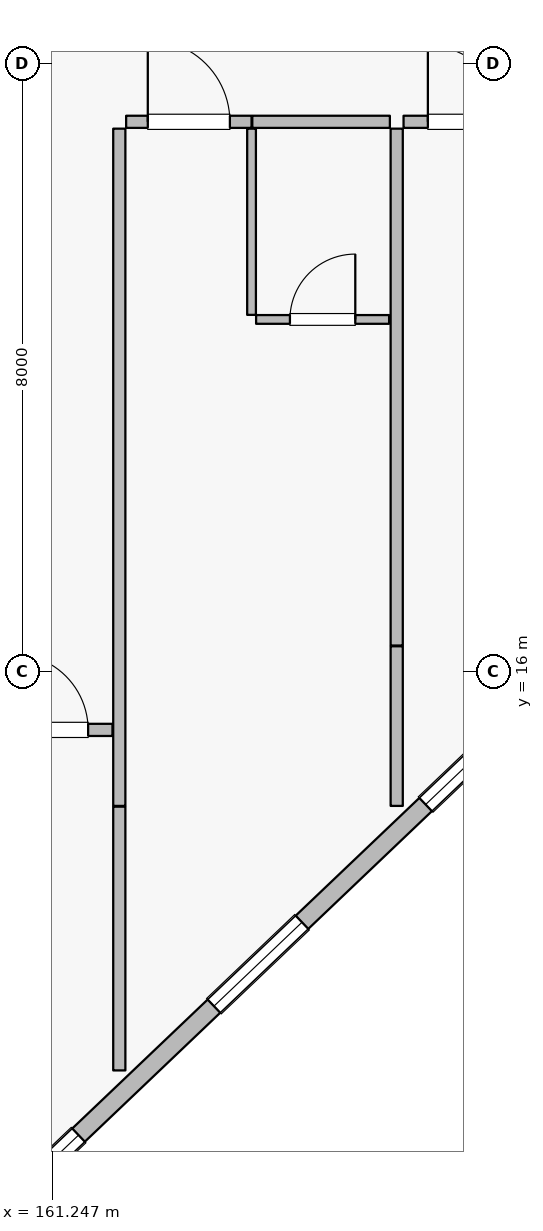
"""IFC4 building model, lengths in metres.
Left out: names, types, materials, properties, quantities, classifications, styles, units other than length and angle.
Written with IfcOpenShell. Run it as: python <this file> out.ifc"""

import sys

from ifc_helpers import new_model, si_unit, direction, frame, frame_2d, origin, place, context, subcontext, project, spatial, rectangle, extrude, element, fill, save


model = new_model("IFC4")
c1 = context("Model", 3, precision=1e-05, world=origin(), true_north=direction((0.0, 1.0)))
c2 = subcontext(c1, "Body", "Model", "MODEL_VIEW")
j1 = project(units=[si_unit("LENGTHUNIT", "METRE"), si_unit("PLANEANGLEUNIT", "RADIAN")], contexts=[c1])
p1 = place(None, origin())
s1 = spatial("IfcSite", under=j1, at=p1, CompositionType="ELEMENT")
p2 = place(p1, origin())
s2 = spatial("IfcBuilding", under=s1, at=p2, CompositionType="ELEMENT")
p3 = place(p2, frame((0.0, 0.0, 11.4)))
s3 = spatial("IfcBuildingStorey", under=s2, at=p3, CompositionType="ELEMENT", Elevation=11.4)
p4 = place(p3, frame((167.6, 15.619, 0.0), z_axis=(0.0, 0.0, 1.0), x_axis=(-0.724156739794, -0.689635422677, 0.0)))
e1 = element("IfcWall", 1, at=p4, inside=s3, PredefinedType="SOLIDWALL", context=c2, shape_type="SweptSolid", body=[
    extrude(rectangle(XDim=10.495, YDim=0.24, at=frame_2d((5.248, 0.0))), origin(), (0.0, 0.0, 1.0), 4.13),
])
p5 = place(p4, frame((0.388, 0.0, 0.8)))
e2 = element("IfcOpeningElement", 2, at=p5, cuts=e1, PredefinedType="OPENING", context=c2, shape_type="SweptSolid", body=[
    extrude(rectangle(XDim=1.6, YDim=1.6, at=frame_2d((0.8, 0.8))), frame((0.0, 0.13, 0.0), z_axis=(0.0, -1.0, 0.0), x_axis=(1.0, 0.0, 0.0)), (0.0, 0.0, 1.0), 0.26),
])
p6 = place(p4, frame((4.234, 0.0, 0.8)))
e3 = element("IfcOpeningElement", 3, at=p6, cuts=e1, PredefinedType="OPENING", context=c2, shape_type="SweptSolid", body=[
    extrude(rectangle(XDim=1.6, YDim=1.6, at=frame_2d((0.8, 0.8))), frame((0.0, 0.13, 0.0), z_axis=(0.0, -1.0, 0.0), x_axis=(1.0, 0.0, 0.0)), (0.0, 0.0, 1.0), 0.26),
])
p7 = place(p4, frame((8.294, 0.0, 0.8)))
e4 = element("IfcOpeningElement", 4, at=p7, cuts=e1, PredefinedType="OPENING", context=c2, shape_type="SweptSolid", body=[
    extrude(rectangle(XDim=1.6, YDim=1.6, at=frame_2d((0.8, 0.8))), frame((0.0, 0.13, 0.0), z_axis=(0.0, -1.0, 0.0), x_axis=(1.0, 0.0, 0.0)), (0.0, 0.0, 1.0), 0.26),
])
p8 = place(p3, frame((160.4, 15.23, 0.0), z_axis=(0.0, 0.0, 1.0), x_axis=(1.0, 0.0, 0.0)))
e5 = element("IfcWall", 5, at=p8, inside=s3, PredefinedType="PARTITIONING", context=c2, shape_type="SweptSolid", body=[
    extrude(rectangle(XDim=1.64, YDim=0.16, at=frame_2d((0.82, 0.0))), origin(), (0.0, 0.0, 1.0), 4.535),
])
p9 = place(p8, frame((0.32, 0.0, 0.0)))
e6 = element("IfcOpeningElement", 6, at=p9, cuts=e5, PredefinedType="OPENING", context=c2, shape_type="SweptSolid", body=[
    extrude(rectangle(XDim=1.0, YDim=2.25, at=frame_2d((0.5, 1.125))), frame((0.0, 0.09, 0.0), z_axis=(0.0, -1.0, 0.0), x_axis=(1.0, 0.0, 0.0)), (0.0, 0.0, 1.0), 0.18),
])
p10 = place(p3, frame((162.13, 10.75, 0.0), z_axis=(0.0, 0.0, 1.0), x_axis=(0.0, 1.0, 0.0)))
e7 = element("IfcWall", 7, at=p10, inside=s3, PredefinedType="PARTITIONING", context=c2, shape_type="SweptSolid", body=[
    extrude(rectangle(XDim=3.47, YDim=0.16, at=frame_2d((1.735, 0.0))), origin(), (0.0, 0.0, 1.0), 4.535),
])
p11 = place(p3, frame((162.22, 23.23, 0.0), z_axis=(0.0, 0.0, 1.0), x_axis=(1.0, 0.0, 0.0)))
e8 = element("IfcWall", 8, at=p11, inside=s3, PredefinedType="PARTITIONING", context=c2, shape_type="SweptSolid", body=[
    extrude(rectangle(XDim=1.65, YDim=0.16, at=frame_2d((0.825, 0.0))), origin(), (0.0, 0.0, 1.0), 4.535),
])
p12 = place(p11, frame((0.285, 0.0, 0.0)))
e9 = element("IfcOpeningElement", 9, at=p12, cuts=e8, PredefinedType="OPENING", context=c2, shape_type="SweptSolid", body=[
    extrude(rectangle(XDim=1.08, YDim=2.3, at=frame_2d((0.54, 1.15))), frame((0.0, 0.09, 0.0), z_axis=(0.0, -1.0, 0.0), x_axis=(1.0, 0.0, 0.0)), (0.0, 0.0, 1.0), 0.18),
])
p13 = place(p3, frame((163.88, 23.23, 0.0), z_axis=(0.0, 0.0, 1.0), x_axis=(1.0, 0.0, 0.0)))
e10 = element("IfcWall", 10, at=p13, inside=s3, PredefinedType="PARTITIONING", context=c2, shape_type="SweptSolid", body=[
    extrude(rectangle(XDim=1.81, YDim=0.16, at=frame_2d((0.905, 0.0))), origin(), (0.0, 0.0, 1.0), 4.535),
])
p14 = place(p3, frame((163.87, 20.69, 0.0), z_axis=(0.0, 0.0, 1.0), x_axis=(0.0, 1.0, 0.0)))
e11 = element("IfcWall", 11, at=p14, inside=s3, PredefinedType="PARTITIONING", context=c2, shape_type="SweptSolid", body=[
    extrude(rectangle(XDim=2.45, YDim=0.115, at=frame_2d((1.225, 0.0))), origin(), (0.0, 0.0, 1.0), 4.535),
])
p15 = place(p3, frame((163.93, 20.63, 0.0), z_axis=(0.0, 0.0, 1.0), x_axis=(1.0, 0.0, 0.0)))
e12 = element("IfcWall", 12, at=p15, inside=s3, PredefinedType="PARTITIONING", context=c2, shape_type="SweptSolid", body=[
    extrude(rectangle(XDim=1.75, YDim=0.115, at=frame_2d((0.875, 0.0))), origin(), (0.0, 0.0, 1.0), 4.535),
])
p16 = place(p15, frame((0.445, 0.0, 0.0)))
e13 = element("IfcOpeningElement", 13, at=p16, cuts=e12, PredefinedType="OPENING", context=c2, shape_type="SweptSolid", body=[
    extrude(rectangle(XDim=0.86, YDim=2.12, at=frame_2d((0.43, 1.06))), frame((0.0, 0.067, 0.0), z_axis=(0.0, -1.0, 0.0), x_axis=(1.0, 0.0, 0.0)), (0.0, 0.0, 1.0), 0.135),
])
p17 = place(p3, frame((162.13, 14.23, 0.0), z_axis=(0.0, 0.0, 1.0), x_axis=(0.0, 1.0, 0.0)))
e14 = element("IfcWall", 14, at=p17, inside=s3, PredefinedType="PARTITIONING", context=c2, shape_type="SweptSolid", body=[
    extrude(rectangle(XDim=8.91, YDim=0.16, at=frame_2d((4.455, 0.0))), origin(), (0.0, 0.0, 1.0), 4.535),
])
p18 = place(p3, frame((165.78, 14.23, 0.0), z_axis=(0.0, 0.0, 1.0), x_axis=(0.0, 1.0, 0.0)))
e15 = element("IfcWall", 15, at=p18, inside=s3, PredefinedType="PARTITIONING", context=c2, shape_type="SweptSolid", body=[
    extrude(rectangle(XDim=2.1, YDim=0.16, at=frame_2d((1.05, 0.0))), origin(), (0.0, 0.0, 1.0), 4.535),
])
p19 = place(p3, frame((165.87, 23.23, 0.0), z_axis=(0.0, 0.0, 1.0), x_axis=(1.0, 0.0, 0.0)))
e16 = element("IfcWall", 16, at=p19, inside=s3, PredefinedType="PARTITIONING", context=c2, shape_type="SweptSolid", body=[
    extrude(rectangle(XDim=1.64, YDim=0.16, at=frame_2d((0.82, 0.0))), origin(), (0.0, 0.0, 1.0), 4.535),
])
p20 = place(p19, frame((0.32, 0.0, 0.0)))
e17 = element("IfcOpeningElement", 17, at=p20, cuts=e16, PredefinedType="OPENING", context=c2, shape_type="SweptSolid", body=[
    extrude(rectangle(XDim=1.0, YDim=2.25, at=frame_2d((0.5, 1.125))), frame((0.0, 0.09, 0.0), z_axis=(0.0, -1.0, 0.0), x_axis=(1.0, 0.0, 0.0)), (0.0, 0.0, 1.0), 0.18),
])
p21 = place(p3, frame((165.78, 16.34, 0.0), z_axis=(0.0, 0.0, 1.0), x_axis=(0.0, 1.0, 0.0)))
e18 = element("IfcWall", 18, at=p21, inside=s3, PredefinedType="PARTITIONING", context=c2, shape_type="SweptSolid", body=[
    extrude(rectangle(XDim=6.8, YDim=0.16, at=frame_2d((3.4, 0.0))), origin(), (0.0, 0.0, 1.0), 4.535),
])
p22 = place(p5, origin())
e19 = element("IfcWindow", 19, at=p22, inside=s3, PartitioningType="SINGLE_PANEL", PredefinedType="WINDOW", context=c2, shape_type="SweptSolid", body=[
    extrude(rectangle(XDim=1.6, YDim=1.6, at=frame_2d((0.8, 0.8))), frame((0.0, 0.03, 0.0), z_axis=(0.0, -1.0, 0.0), x_axis=(1.0, 0.0, 0.0)), (0.0, 0.0, 1.0), 0.06),
])
fill(e2, e19)
p23 = place(p6, origin())
e20 = element("IfcWindow", 20, at=p23, inside=s3, PartitioningType="SINGLE_PANEL", PredefinedType="WINDOW", context=c2, shape_type="SweptSolid", body=[
    extrude(rectangle(XDim=1.6, YDim=1.6, at=frame_2d((0.8, 0.8))), frame((0.0, 0.03, 0.0), z_axis=(0.0, -1.0, 0.0), x_axis=(1.0, 0.0, 0.0)), (0.0, 0.0, 1.0), 0.06),
])
fill(e3, e20)
p24 = place(p7, origin())
e21 = element("IfcWindow", 21, at=p24, inside=s3, PartitioningType="SINGLE_PANEL", PredefinedType="WINDOW", context=c2, shape_type="SweptSolid", body=[
    extrude(rectangle(XDim=1.6, YDim=1.6, at=frame_2d((0.8, 0.8))), frame((0.0, 0.03, 0.0), z_axis=(0.0, -1.0, 0.0), x_axis=(1.0, 0.0, 0.0)), (0.0, 0.0, 1.0), 0.06),
])
fill(e4, e21)
p25 = place(p9, origin())
e22 = element("IfcDoor", 22, at=p25, inside=s3, OperationType="SINGLE_SWING_LEFT", PredefinedType="DOOR", context=c2, shape_type="SweptSolid", body=[
    extrude(rectangle(XDim=1.0, YDim=2.25, at=frame_2d((0.5, 1.125))), frame((0.0, 0.025, 0.0), z_axis=(0.0, -1.0, 0.0), x_axis=(1.0, 0.0, 0.0)), (0.0, 0.0, 1.0), 0.05),
])
fill(e6, e22)
p26 = place(p12, origin())
e23 = element("IfcDoor", 23, at=p26, inside=s3, OperationType="SINGLE_SWING_LEFT", PredefinedType="DOOR", context=c2, shape_type="SweptSolid", body=[
    extrude(rectangle(XDim=1.08, YDim=2.3, at=frame_2d((0.54, 1.15))), frame((0.0, 0.025, 0.0), z_axis=(0.0, -1.0, 0.0), x_axis=(1.0, 0.0, 0.0)), (0.0, 0.0, 1.0), 0.05),
])
fill(e9, e23)
p27 = place(p16, origin())
e24 = element("IfcDoor", 24, at=p27, inside=s3, OperationType="SINGLE_SWING_RIGHT", PredefinedType="DOOR", context=c2, shape_type="SweptSolid", body=[
    extrude(rectangle(XDim=0.86, YDim=2.12, at=frame_2d((0.43, 1.06))), frame((0.0, 0.025, 0.0), z_axis=(0.0, -1.0, 0.0), x_axis=(1.0, 0.0, 0.0)), (0.0, 0.0, 1.0), 0.05),
])
fill(e13, e24)
p28 = place(p20, origin())
e25 = element("IfcDoor", 25, at=p28, inside=s3, OperationType="SINGLE_SWING_LEFT", PredefinedType="DOOR", context=c2, shape_type="SweptSolid", body=[
    extrude(rectangle(XDim=1.0, YDim=2.25, at=frame_2d((0.5, 1.125))), frame((0.0, 0.025, 0.0), z_axis=(0.0, -1.0, 0.0), x_axis=(1.0, 0.0, 0.0)), (0.0, 0.0, 1.0), 0.05),
])
fill(e17, e25)
save(model, sys.argv[1])
